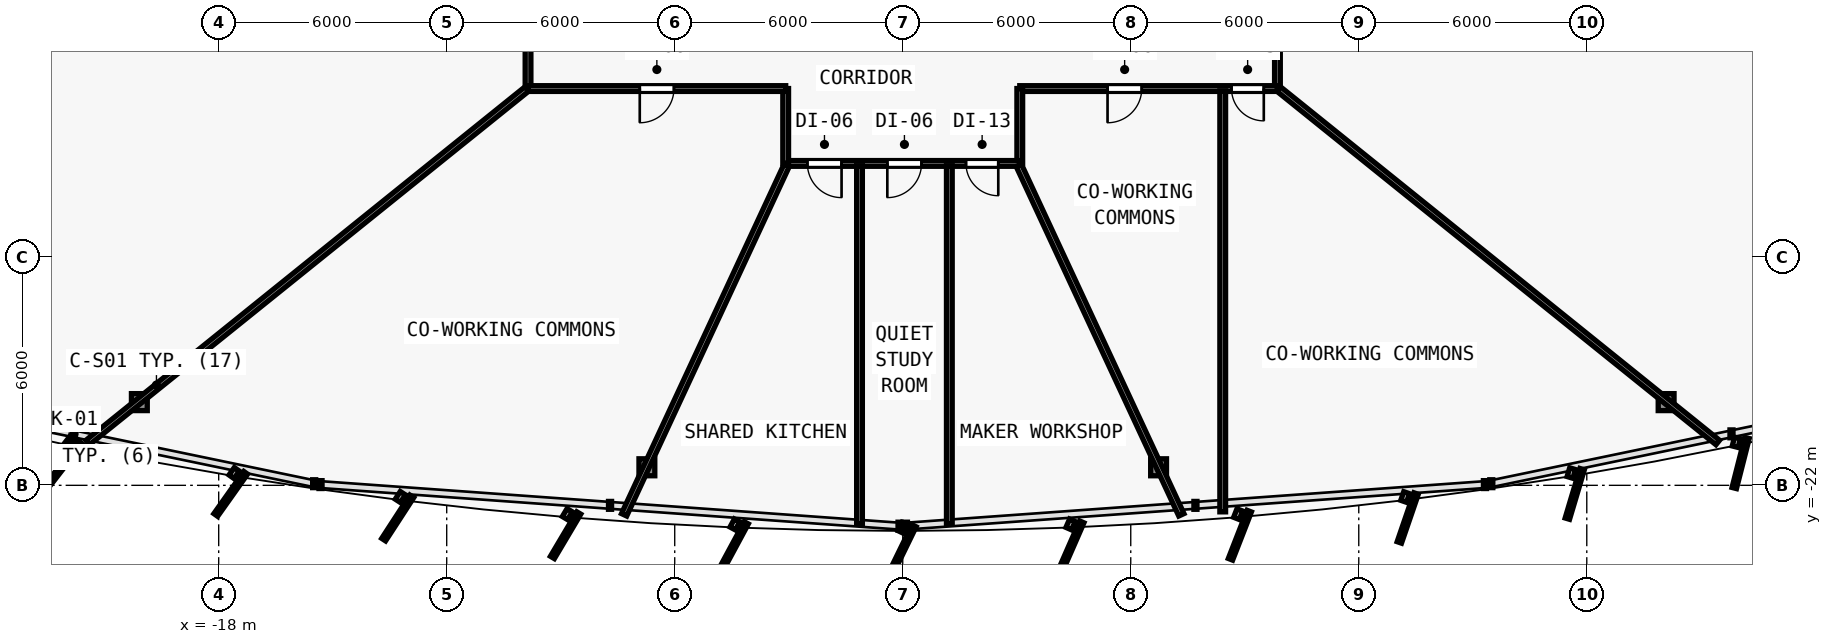
"""IFC4 building model, lengths in metres.
Left out: names, types, materials, properties, quantities, classifications, styles, units other than length and angle.
Written with IfcOpenShell. Run it as: python <this file> out.ifc"""

import sys

from ifc_helpers import new_model, si_unit, direction, frame, frame_2d, origin, origin_2d, place, context, subcontext, project, spatial, rectangle, i_section, extrude, element, fill, save


model = new_model("IFC4")
c1 = context("Model", 3, precision=1e-05, world=origin(), true_north=direction((0.0, 1.0)))
c2 = subcontext(c1, "Body", "Model", "MODEL_VIEW")
j1 = project(units=[si_unit("LENGTHUNIT", "METRE"), si_unit("PLANEANGLEUNIT", "RADIAN")], contexts=[c1])
p1 = place(None, origin())
s1 = spatial("IfcSite", under=j1, at=p1, CompositionType="ELEMENT")
p2 = place(p1, origin())
s2 = spatial("IfcBuilding", under=s1, at=p2, CompositionType="ELEMENT")
p3 = place(p2, frame((0.0, 0.0, 40.8)))
s3 = spatial("IfcBuildingStorey", under=s2, at=p3, CompositionType="ELEMENT", Elevation=40.8)
p4 = place(p3, frame((-20.088, -19.811, 0.005), z_axis=(0.021205716244, 0.034391321857, 0.999183443908), x_axis=(-0.851195920716, 0.524848077596, 0.0)))
e1 = element("IfcColumn", 1, at=p4, inside=s3, PredefinedType="COLUMN", context=c2, shape_type="SweptSolid", body=[
    extrude(i_section(OverallWidth=0.416, OverallDepth=0.446, WebThickness=0.025, FlangeThickness=0.04, FilletRadius=0.015, at=origin_2d()), origin(), (0.0, 0.0, 1.0), 3.592),
])
for number, where, z_axis, x_axis in (
    (2, (-6.732, -21.525, 0.005), (0.007, 0.036, 0.999), (-0.981, 0.192, 0.0)),
    (3, (6.732, -21.525, 0.005), (-0.007, 0.036, 0.999), (-0.981, -0.192, 0.0)),
):
    element("IfcColumn", number, at=place(p3, frame(where, z_axis=z_axis, x_axis=x_axis)), inside=s3, PredefinedType="COLUMN", context=c2, shape_type="SweptSolid", body=[
        extrude(i_section(OverallWidth=0.416, OverallDepth=0.446, WebThickness=0.025, FlangeThickness=0.04, FilletRadius=0.015, at=origin_2d()), origin(), (0.0, 0.0, 1.0), 3.592),
    ])
p5 = place(p3, frame((20.088, -19.811, 0.005), z_axis=(-0.021205716244, 0.034391321857, 0.999183443908), x_axis=(-0.851195920716, -0.524848077596, 0.0)))
e4 = element("IfcColumn", 4, at=p5, inside=s3, PredefinedType="COLUMN", context=c2, shape_type="SweptSolid", body=[
    extrude(i_section(OverallWidth=0.416, OverallDepth=0.446, WebThickness=0.025, FlangeThickness=0.04, FilletRadius=0.015, at=origin_2d()), origin(), (0.0, 0.0, 1.0), 3.592),
])
p6 = place(p3, frame((-9.86, -11.56, 0.0), z_axis=(0.0, 0.0, 1.0), x_axis=(0.0, 1.0, 0.0)))
e5 = element("IfcWall", 5, at=p6, inside=s3, PredefinedType="PARTITIONING", context=c2, shape_type="SweptSolid", body=[
    extrude(rectangle(XDim=19.986, YDim=0.15, at=frame_2d((9.993, 0.0))), origin(), (0.0, 0.0, 1.0), 2.609),
])
p7 = place(p6, frame((10.205, 0.0, 0.0)))
e6 = element("IfcOpeningElement", 6, at=p7, cuts=e5, PredefinedType="OPENING", context=c2, shape_type="SweptSolid", body=[
    extrude(rectangle(XDim=0.9, YDim=2.1, at=frame_2d((0.45, 1.05))), frame((0.0, 0.085, 0.0), z_axis=(0.0, -1.0, 0.0), x_axis=(1.0, 0.0, 0.0)), (0.0, 0.0, 1.0), 0.17),
])
p8 = place(p6, frame((3.36, 0.0, 0.0)))
e7 = element("IfcOpeningElement", 7, at=p8, cuts=e5, PredefinedType="OPENING", context=c2, shape_type="SweptSolid", body=[
    extrude(rectangle(XDim=0.9, YDim=2.1, at=frame_2d((0.45, 1.05))), frame((0.0, 0.085, 0.0), z_axis=(0.0, -1.0, 0.0), x_axis=(1.0, 0.0, 0.0)), (0.0, 0.0, 1.0), 0.17),
])
p9 = place(p6, frame((17.97, 0.0, 0.0)))
e8 = element("IfcOpeningElement", 8, at=p9, cuts=e5, PredefinedType="OPENING", context=c2, shape_type="SweptSolid", body=[
    extrude(rectangle(XDim=0.9, YDim=2.1, at=frame_2d((0.45, 1.05))), frame((0.0, 0.085, 0.0), z_axis=(0.0, -1.0, 0.0), x_axis=(1.0, 0.0, 0.0)), (0.0, 0.0, 1.0), 0.17),
])
p10 = place(p6, frame((15.0, 0.0, 0.0)))
e9 = element("IfcOpeningElement", 9, at=p10, cuts=e5, PredefinedType="OPENING", context=c2, shape_type="SweptSolid", body=[
    extrude(rectangle(XDim=0.9, YDim=2.1, at=frame_2d((0.45, 1.05))), frame((0.0, 0.085, 0.0), z_axis=(0.0, -1.0, 0.0), x_axis=(1.0, 0.0, 0.0)), (0.0, 0.0, 1.0), 0.17),
])
p11 = place(p3, frame((9.86, 8.426, 0.0), z_axis=(0.0, 0.0, 1.0), x_axis=(0.0, -1.0, 0.0)))
e10 = element("IfcWall", 10, at=p11, inside=s3, PredefinedType="PARTITIONING", context=c2, shape_type="SweptSolid", body=[
    extrude(rectangle(XDim=19.986, YDim=0.15, at=frame_2d((9.993, 0.0))), origin(), (0.0, 0.0, 1.0), 2.609),
])
p12 = place(p11, frame((14.399, 0.0, 0.0)))
e11 = element("IfcOpeningElement", 11, at=p12, cuts=e10, PredefinedType="OPENING", context=c2, shape_type="SweptSolid", body=[
    extrude(rectangle(XDim=0.9, YDim=2.1, at=frame_2d((0.45, 1.05))), frame((0.0, 0.085, 0.0), z_axis=(0.0, -1.0, 0.0), x_axis=(1.0, 0.0, 0.0)), (0.0, 0.0, 1.0), 0.17),
])
p13 = place(p3, frame((9.86, -11.56, 0.0), z_axis=(0.0, 0.0, 1.0), x_axis=(-1.0, 0.0, 0.0)))
e12 = element("IfcWall", 12, at=p13, inside=s3, PredefinedType="PARTITIONING", context=c2, shape_type="SweptSolid", body=[
    extrude(rectangle(XDim=6.78, YDim=0.15, at=frame_2d((3.39, 0.0))), origin(), (0.0, 0.0, 1.0), 2.609),
])
p14 = place(p13, frame((3.571, 0.0, 0.0)))
e13 = element("IfcOpeningElement", 13, at=p14, cuts=e12, PredefinedType="OPENING", context=c2, shape_type="SweptSolid", body=[
    extrude(rectangle(XDim=0.9, YDim=2.1, at=frame_2d((0.45, 1.05))), frame((0.0, 0.085, 0.0), z_axis=(0.0, -1.0, 0.0), x_axis=(1.0, 0.0, 0.0)), (0.0, 0.0, 1.0), 0.17),
])
p15 = place(p13, frame((0.359, 0.0, 0.0)))
e14 = element("IfcOpeningElement", 14, at=p15, cuts=e12, PredefinedType="OPENING", context=c2, shape_type="SweptSolid", body=[
    extrude(rectangle(XDim=0.85, YDim=2.1, at=frame_2d((0.425, 1.05))), frame((0.0, 0.085, 0.0), z_axis=(0.0, -1.0, 0.0), x_axis=(1.0, 0.0, 0.0)), (0.0, 0.0, 1.0), 0.17),
])
p16 = place(p3, frame((3.08, -11.56, 0.0), z_axis=(0.0, 0.0, 1.0), x_axis=(0.0, -1.0, 0.0)))
e15 = element("IfcWall", 15, at=p16, inside=s3, PredefinedType="PARTITIONING", context=c2, shape_type="SweptSolid", body=[
    extrude(rectangle(XDim=1.97, YDim=0.15, at=frame_2d((0.985, 0.0))), origin(), (0.0, 0.0, 1.0), 2.995),
])
p17 = place(p3, frame((3.08, -13.53, 0.0), z_axis=(0.0, 0.0, 1.0), x_axis=(-1.0, 0.0, 0.0)))
e16 = element("IfcWall", 16, at=p17, inside=s3, PredefinedType="PARTITIONING", context=c2, shape_type="SweptSolid", body=[
    extrude(rectangle(XDim=6.16, YDim=0.15, at=frame_2d((3.08, 0.0))), origin(), (0.0, 0.0, 1.0), 2.725),
])
p18 = place(p17, frame((4.69, 0.0, 0.0)))
e17 = element("IfcOpeningElement", 17, at=p18, cuts=e16, PredefinedType="OPENING", context=c2, shape_type="SweptSolid", body=[
    extrude(rectangle(XDim=0.9, YDim=2.1, at=frame_2d((0.45, 1.05))), frame((0.0, 0.085, 0.0), z_axis=(0.0, -1.0, 0.0), x_axis=(1.0, 0.0, 0.0)), (0.0, 0.0, 1.0), 0.17),
])
p19 = place(p17, frame((2.586, 0.0, 0.0)))
e18 = element("IfcOpeningElement", 18, at=p19, cuts=e16, PredefinedType="OPENING", context=c2, shape_type="SweptSolid", body=[
    extrude(rectangle(XDim=0.9, YDim=2.1, at=frame_2d((0.45, 1.05))), frame((0.0, 0.085, 0.0), z_axis=(0.0, -1.0, 0.0), x_axis=(1.0, 0.0, 0.0)), (0.0, 0.0, 1.0), 0.17),
])
p20 = place(p17, frame((0.566, 0.0, 0.0)))
e19 = element("IfcOpeningElement", 19, at=p20, cuts=e16, PredefinedType="OPENING", context=c2, shape_type="SweptSolid", body=[
    extrude(rectangle(XDim=0.85, YDim=2.1, at=frame_2d((0.425, 1.05))), frame((0.0, 0.085, 0.0), z_axis=(0.0, -1.0, 0.0), x_axis=(1.0, 0.0, 0.0)), (0.0, 0.0, 1.0), 0.17),
])
p21 = place(p3, frame((-3.08, -13.53, 0.0), z_axis=(0.0, 0.0, 1.0), x_axis=(0.0, 1.0, 0.0)))
e20 = element("IfcWall", 20, at=p21, inside=s3, PredefinedType="PARTITIONING", context=c2, shape_type="SweptSolid", body=[
    extrude(rectangle(XDim=1.97, YDim=0.15, at=frame_2d((0.985, 0.0))), origin(), (0.0, 0.0, 1.0), 2.875),
])
p22 = place(p3, frame((-3.08, -11.56, 0.0), z_axis=(0.0, 0.0, 1.0), x_axis=(-1.0, 0.0, 0.0)))
e21 = element("IfcWall", 21, at=p22, inside=s3, PredefinedType="PARTITIONING", context=c2, shape_type="SweptSolid", body=[
    extrude(rectangle(XDim=6.78, YDim=0.15, at=frame_2d((3.39, 0.0))), origin(), (0.0, 0.0, 1.0), 2.609),
])
p23 = place(p22, frame((2.94, 0.0, 0.0)))
e22 = element("IfcOpeningElement", 22, at=p23, cuts=e21, PredefinedType="OPENING", context=c2, shape_type="SweptSolid", body=[
    extrude(rectangle(XDim=0.9, YDim=2.1, at=frame_2d((0.45, 1.05))), frame((0.0, 0.085, 0.0), z_axis=(0.0, -1.0, 0.0), x_axis=(1.0, 0.0, 0.0)), (0.0, 0.0, 1.0), 0.17),
])
p24 = place(p3, frame((-9.888, -11.569, 0.0), z_axis=(0.0, 0.0, 1.0), x_axis=(-0.778962871417, -0.627070047884, 0.0)))
e23 = element("IfcWall", 23, at=p24, inside=s3, PredefinedType="PARTITIONING", context=c2, shape_type="SweptSolid", body=[
    extrude(rectangle(XDim=14.837, YDim=0.15, at=frame_2d((7.418, 0.0))), origin(), (0.0, 0.0, 1.0), 2.609),
])
for number, where, z_axis, x_axis in (
    (24, (-3.053, -13.579, 0.0), (0.0, 0.0, 1.0), (-0.422, -0.907, 0.0)),
    (25, (3.053, -13.579, 0.0), (0.0, 0.0, 1.0), (0.422, -0.907, 0.0)),
):
    element("IfcWall", number, at=place(p3, frame(where, z_axis=z_axis, x_axis=x_axis)), inside=s3, PredefinedType="PARTITIONING", context=c2, shape_type="SweptSolid", body=[
        extrude(rectangle(XDim=10.143, YDim=0.15, at=frame_2d((5.071, 0.0))), origin(), (0.0, 0.0, 1.0), 2.725),
    ])
p25 = place(p3, frame((9.888, -11.569, 0.0), z_axis=(0.0, 0.0, 1.0), x_axis=(0.778962871417, -0.627070047884, 0.0)))
e26 = element("IfcWall", 26, at=p25, inside=s3, PredefinedType="PARTITIONING", context=c2, shape_type="SweptSolid", body=[
    extrude(rectangle(XDim=14.837, YDim=0.15, at=frame_2d((7.418, 0.0))), origin(), (0.0, 0.0, 1.0), 2.609),
])
p26 = place(p3, frame((-1.137, -13.59, 0.0), z_axis=(0.0, 0.0, 1.0), x_axis=(0.0, -1.0, 0.0)))
e27 = element("IfcWall", 27, at=p26, inside=s3, PredefinedType="PARTITIONING", context=c2, shape_type="SweptSolid", body=[
    extrude(rectangle(XDim=9.428, YDim=0.15, at=frame_2d((4.714, 0.0))), origin(), (0.0, 0.0, 1.0), 2.735),
])
p27 = place(p3, frame((1.226, -13.59, 0.0), z_axis=(0.0, 0.0, 1.0), x_axis=(0.0, -1.0, 0.0)))
e28 = element("IfcWall", 28, at=p27, inside=s3, PredefinedType="PARTITIONING", context=c2, shape_type="SweptSolid", body=[
    extrude(rectangle(XDim=9.427, YDim=0.15, at=frame_2d((4.714, 0.0))), origin(), (0.0, 0.0, 1.0), 2.735),
])
p28 = place(p3, frame((8.42, -11.62, 0.0), z_axis=(0.0, 0.0, 1.0), x_axis=(0.0, -1.0, 0.0)))
e29 = element("IfcWall", 29, at=p28, inside=s3, PredefinedType="PARTITIONING", context=c2, shape_type="SweptSolid", body=[
    extrude(rectangle(XDim=11.077, YDim=0.15, at=frame_2d((5.539, 0.0))), origin(), (0.0, 0.0, 1.0), 2.735),
])
p29 = place(p23, origin())
e30 = element("IfcDoor", 30, at=p29, inside=s3, OperationType="SINGLE_SWING_RIGHT", PredefinedType="DOOR", context=c2, shape_type="SweptSolid", body=[
    extrude(rectangle(XDim=0.9, YDim=2.1, at=frame_2d((0.45, 1.05))), frame((0.0, 0.025, 0.0), z_axis=(0.0, -1.0, 0.0), x_axis=(1.0, 0.0, 0.0)), (0.0, 0.0, 1.0), 0.05),
])
fill(e22, e30)
p30 = place(p18, origin())
e31 = element("IfcDoor", 31, at=p30, inside=s3, OperationType="SINGLE_SWING_LEFT", PredefinedType="DOOR", context=c2, shape_type="SweptSolid", body=[
    extrude(rectangle(XDim=0.9, YDim=2.1, at=frame_2d((0.45, 1.05))), frame((0.0, 0.025, 0.0), z_axis=(0.0, -1.0, 0.0), x_axis=(1.0, 0.0, 0.0)), (0.0, 0.0, 1.0), 0.05),
])
fill(e17, e31)
p31 = place(p19, origin())
e32 = element("IfcDoor", 32, at=p31, inside=s3, OperationType="SINGLE_SWING_RIGHT", PredefinedType="DOOR", context=c2, shape_type="SweptSolid", body=[
    extrude(rectangle(XDim=0.9, YDim=2.1, at=frame_2d((0.45, 1.05))), frame((0.0, 0.025, 0.0), z_axis=(0.0, -1.0, 0.0), x_axis=(1.0, 0.0, 0.0)), (0.0, 0.0, 1.0), 0.05),
])
fill(e18, e32)
p32 = place(p20, origin())
e33 = element("IfcDoor", 33, at=p32, inside=s3, OperationType="SINGLE_SWING_LEFT", PredefinedType="DOOR", context=c2, shape_type="SweptSolid", body=[
    extrude(rectangle(XDim=0.85, YDim=2.1, at=frame_2d((0.425, 1.05))), frame((0.0, 0.025, 0.0), z_axis=(0.0, -1.0, 0.0), x_axis=(1.0, 0.0, 0.0)), (0.0, 0.0, 1.0), 0.05),
])
fill(e19, e33)
p33 = place(p14, origin())
e34 = element("IfcDoor", 34, at=p33, inside=s3, OperationType="SINGLE_SWING_RIGHT", PredefinedType="DOOR", context=c2, shape_type="SweptSolid", body=[
    extrude(rectangle(XDim=0.9, YDim=2.1, at=frame_2d((0.45, 1.05))), frame((0.0, 0.025, 0.0), z_axis=(0.0, -1.0, 0.0), x_axis=(1.0, 0.0, 0.0)), (0.0, 0.0, 1.0), 0.05),
])
fill(e13, e34)
p34 = place(p15, origin())
e35 = element("IfcDoor", 35, at=p34, inside=s3, OperationType="SINGLE_SWING_LEFT", PredefinedType="DOOR", context=c2, shape_type="SweptSolid", body=[
    extrude(rectangle(XDim=0.85, YDim=2.1, at=frame_2d((0.425, 1.05))), frame((0.0, 0.025, 0.0), z_axis=(0.0, -1.0, 0.0), x_axis=(1.0, 0.0, 0.0)), (0.0, 0.0, 1.0), 0.05),
])
fill(e14, e35)
save(model, sys.argv[1])
